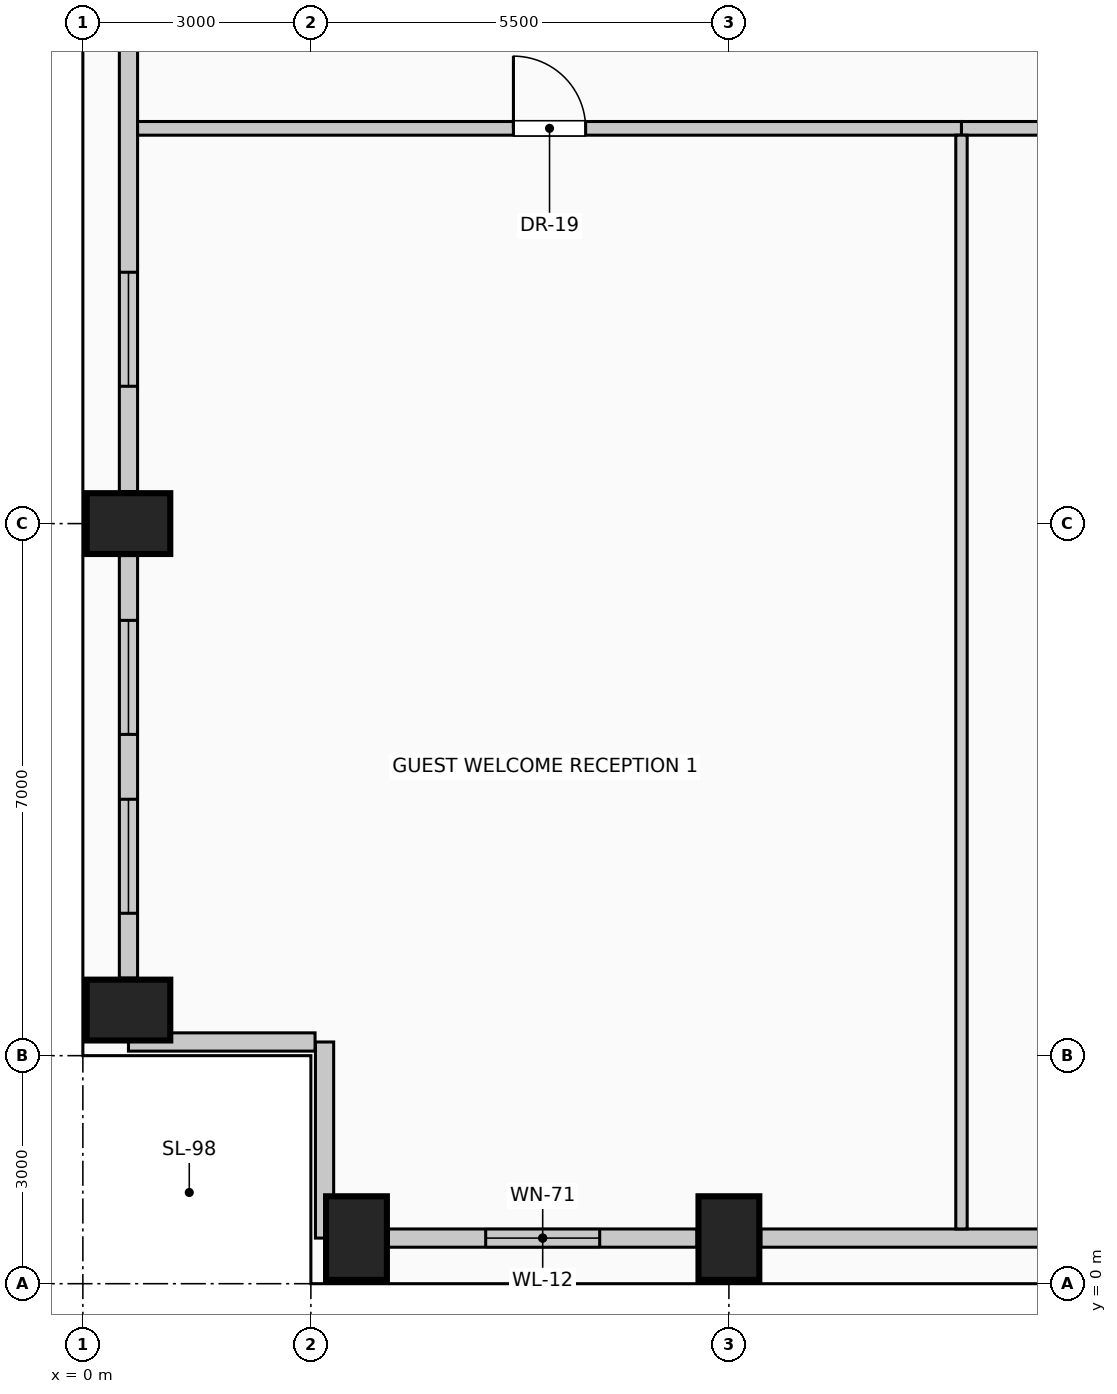
"""IFC4 building model, lengths in metres.
Left out: names, types, materials, properties, quantities, classifications, styles, units other than length and angle.
Written with IfcOpenShell. Run it as: python <this file> out.ifc"""

import sys

from ifc_helpers import new_model, si_unit, direction, frame, frame_2d, origin, origin_2d, place, context, subcontext, project, spatial, rectangle, extrude, element, fill, save


model = new_model("IFC4")
c1 = context("Model", 3, precision=1e-05, world=origin(), true_north=direction((0.0, 1.0)))
c2 = subcontext(c1, "Body", "Model", "MODEL_VIEW")
j1 = project(units=[si_unit("LENGTHUNIT", "METRE"), si_unit("PLANEANGLEUNIT", "RADIAN")], contexts=[c1])
p1 = place(None, origin())
s1 = spatial("IfcSite", under=j1, at=p1, CompositionType="ELEMENT")
p2 = place(p1, origin())
s2 = spatial("IfcBuilding", under=s1, at=p2, CompositionType="ELEMENT")
p3 = place(p2, frame((0.0, 0.0, 170.6)))
s3 = spatial("IfcBuildingStorey", under=s2, at=p3, CompositionType="ELEMENT", Elevation=170.6)
for number, where, z_axis, x_axis in (
    (1, (3.6, 0.6, 0.0), (0.0, 0.0, 1.0), (1.0, 0.0, 0.0)),
    (2, (8.5, 0.6, 0.0), (0.0, 0.0, 1.0), (1.0, 0.0, 0.0)),
    (3, (0.6, 3.6, 0.0), (0.0, 0.0, 1.0), (0.0, 1.0, 0.0)),
    (4, (0.6, 10.0, 0.0), (0.0, 0.0, 1.0), (0.0, 1.0, 0.0)),
):
    element("IfcColumn", number, at=place(p3, frame(where, z_axis=z_axis, x_axis=x_axis)), inside=s3, PredefinedType="COLUMN", context=c2, shape_type="SweptSolid", body=[
        extrude(rectangle(XDim=0.8, YDim=1.1, at=origin_2d()), origin(), (0.0, 0.0, 1.0), 4.0),
    ])
p4 = place(p3, frame((8.08, 0.6, 0.0), z_axis=(0.0, 0.0, 1.0), x_axis=(-1.0, 0.0, 0.0)))
e5 = element("IfcWall", 5, at=p4, inside=s3, PredefinedType="SOLIDWALL", context=c2, shape_type="SweptSolid", body=[
    extrude(rectangle(XDim=4.06, YDim=0.24, at=frame_2d((2.03, 0.0))), origin(), (0.0, 0.0, 1.0), 2.975),
])
p5 = place(p4, frame((1.28, 0.0, 0.42)))
e6 = element("IfcOpeningElement", 6, at=p5, cuts=e5, PredefinedType="OPENING", context=c2, shape_type="SweptSolid", body=[
    extrude(rectangle(XDim=1.5, YDim=2.2, at=frame_2d((0.75, 1.1))), frame((0.0, 0.13, 0.0), z_axis=(0.0, -1.0, 0.0), x_axis=(1.0, 0.0, 0.0)), (0.0, 0.0, 1.0), 0.26),
])
p6 = place(p3, frame((13.58, 0.6, 0.0), z_axis=(0.0, 0.0, 1.0), x_axis=(-1.0, 0.0, 0.0)))
e7 = element("IfcWall", 7, at=p6, inside=s3, PredefinedType="SOLIDWALL", context=c2, shape_type="SweptSolid", body=[
    extrude(rectangle(XDim=4.66, YDim=0.24, at=frame_2d((2.33, 0.0))), origin(), (0.0, 0.0, 1.0), 2.975),
])
p7 = place(p3, frame((0.6, 4.02, 0.0), z_axis=(0.0, 0.0, 1.0), x_axis=(0.0, 1.0, 0.0)))
e8 = element("IfcWall", 8, at=p7, inside=s3, PredefinedType="SOLIDWALL", context=c2, shape_type="SweptSolid", body=[
    extrude(rectangle(XDim=5.56, YDim=0.24, at=frame_2d((2.78, 0.0))), origin(), (0.0, 0.0, 1.0), 2.975),
])
p8 = place(p7, frame((0.853, 0.0, 0.42)))
e9 = element("IfcOpeningElement", 9, at=p8, cuts=e8, PredefinedType="OPENING", context=c2, shape_type="SweptSolid", body=[
    extrude(rectangle(XDim=1.5, YDim=2.2, at=frame_2d((0.75, 1.1))), frame((0.0, 0.13, 0.0), z_axis=(0.0, -1.0, 0.0), x_axis=(1.0, 0.0, 0.0)), (0.0, 0.0, 1.0), 0.26),
])
p9 = place(p7, frame((3.207, 0.0, 0.42)))
e10 = element("IfcOpeningElement", 10, at=p9, cuts=e8, PredefinedType="OPENING", context=c2, shape_type="SweptSolid", body=[
    extrude(rectangle(XDim=1.5, YDim=2.2, at=frame_2d((0.75, 1.1))), frame((0.0, 0.13, 0.0), z_axis=(0.0, -1.0, 0.0), x_axis=(1.0, 0.0, 0.0)), (0.0, 0.0, 1.0), 0.26),
])
p10 = place(p3, frame((0.6, 10.42, 0.0), z_axis=(0.0, 0.0, 1.0), x_axis=(0.0, 1.0, 0.0)))
e11 = element("IfcWall", 11, at=p10, inside=s3, PredefinedType="SOLIDWALL", context=c2, shape_type="SweptSolid", body=[
    extrude(rectangle(XDim=7.16, YDim=0.24, at=frame_2d((3.58, 0.0))), origin(), (0.0, 0.0, 1.0), 2.975),
])
p11 = place(p10, frame((1.387, 0.0, 0.42)))
e12 = element("IfcOpeningElement", 12, at=p11, cuts=e11, PredefinedType="OPENING", context=c2, shape_type="SweptSolid", body=[
    extrude(rectangle(XDim=1.5, YDim=2.2, at=frame_2d((0.75, 1.1))), frame((0.0, 0.13, 0.0), z_axis=(0.0, -1.0, 0.0), x_axis=(1.0, 0.0, 0.0)), (0.0, 0.0, 1.0), 0.26),
])
p12 = place(p3, frame((3.18, 0.6, 0.0), z_axis=(0.0, 0.0, 1.0), x_axis=(0.0, 1.0, 0.0)))
e13 = element("IfcWall", 13, at=p12, inside=s3, PredefinedType="SOLIDWALL", context=c2, shape_type="SweptSolid", body=[
    extrude(rectangle(XDim=2.58, YDim=0.24, at=frame_2d((1.29, 0.0))), origin(), (0.0, 0.0, 1.0), 3.725),
])
p13 = place(p3, frame((3.055, 3.18, 0.0), z_axis=(0.0, 0.0, 1.0), x_axis=(-1.0, 0.0, 0.0)))
e14 = element("IfcWall", 14, at=p13, inside=s3, PredefinedType="SOLIDWALL", context=c2, shape_type="SweptSolid", body=[
    extrude(rectangle(XDim=2.455, YDim=0.24, at=frame_2d((1.228, 0.0))), origin(), (0.0, 0.0, 1.0), 3.725),
])
p14 = place(p3, frame((0.72, 15.2, 0.0), z_axis=(0.0, 0.0, 1.0), x_axis=(1.0, 0.0, 0.0)))
e15 = element("IfcWall", 15, at=p14, inside=s3, PredefinedType="PARTITIONING", context=c2, shape_type="SweptSolid", body=[
    extrude(rectangle(XDim=10.84, YDim=0.18, at=frame_2d((5.42, 0.0))), origin(), (0.0, 0.0, 1.0), 3.725),
])
p15 = place(p14, frame((4.945, 0.0, 0.0)))
e16 = element("IfcOpeningElement", 16, at=p15, cuts=e15, PredefinedType="OPENING", context=c2, shape_type="SweptSolid", body=[
    extrude(rectangle(XDim=0.95, YDim=2.15, at=frame_2d((0.475, 1.075))), frame((0.0, 0.1, 0.0), z_axis=(0.0, -1.0, 0.0), x_axis=(1.0, 0.0, 0.0)), (0.0, 0.0, 1.0), 0.2),
])
p16 = place(p3, frame((11.56, 15.2, 0.0), z_axis=(0.0, 0.0, 1.0), x_axis=(1.0, 0.0, 0.0)))
e17 = element("IfcWall", 17, at=p16, inside=s3, PredefinedType="PARTITIONING", context=c2, shape_type="SweptSolid", body=[
    extrude(rectangle(XDim=6.0, YDim=0.18, at=frame_2d((3.0, 0.0))), origin(), (0.0, 0.0, 1.0), 3.725),
])
p17 = place(p16, frame((2.56, 0.0, 0.0)))
e18 = element("IfcOpeningElement", 18, at=p17, cuts=e17, PredefinedType="OPENING", context=c2, shape_type="SweptSolid", body=[
    extrude(rectangle(XDim=0.88, YDim=2.1, at=frame_2d((0.44, 1.05))), frame((0.0, 0.1, 0.0), z_axis=(0.0, -1.0, 0.0), x_axis=(1.0, 0.0, 0.0)), (0.0, 0.0, 1.0), 0.2),
])
p18 = place(p3, frame((11.56, 0.72, 0.0), z_axis=(0.0, 0.0, 1.0), x_axis=(0.0, 1.0, 0.0)))
e19 = element("IfcWall", 19, at=p18, inside=s3, PredefinedType="PARTITIONING", context=c2, shape_type="SweptSolid", body=[
    extrude(rectangle(XDim=14.39, YDim=0.15, at=frame_2d((7.195, 0.0))), origin(), (0.0, 0.0, 1.0), 3.725),
])
p19 = place(p5, origin())
e20 = element("IfcWindow", 20, at=p19, inside=s3, PartitioningType="SINGLE_PANEL", PredefinedType="WINDOW", context=c2, shape_type="SweptSolid", body=[
    extrude(rectangle(XDim=1.5, YDim=2.2, at=frame_2d((0.75, 1.1))), frame((0.0, 0.03, 0.0), z_axis=(0.0, -1.0, 0.0), x_axis=(1.0, 0.0, 0.0)), (0.0, 0.0, 1.0), 0.06),
])
fill(e6, e20)
p20 = place(p8, origin())
e21 = element("IfcWindow", 21, at=p20, inside=s3, PartitioningType="SINGLE_PANEL", PredefinedType="WINDOW", context=c2, shape_type="SweptSolid", body=[
    extrude(rectangle(XDim=1.5, YDim=2.2, at=frame_2d((0.75, 1.1))), frame((0.0, 0.03, 0.0), z_axis=(0.0, -1.0, 0.0), x_axis=(1.0, 0.0, 0.0)), (0.0, 0.0, 1.0), 0.06),
])
fill(e9, e21)
p21 = place(p9, origin())
e22 = element("IfcWindow", 22, at=p21, inside=s3, PartitioningType="SINGLE_PANEL", PredefinedType="WINDOW", context=c2, shape_type="SweptSolid", body=[
    extrude(rectangle(XDim=1.5, YDim=2.2, at=frame_2d((0.75, 1.1))), frame((0.0, 0.03, 0.0), z_axis=(0.0, -1.0, 0.0), x_axis=(1.0, 0.0, 0.0)), (0.0, 0.0, 1.0), 0.06),
])
fill(e10, e22)
p22 = place(p11, origin())
e23 = element("IfcWindow", 23, at=p22, inside=s3, PartitioningType="SINGLE_PANEL", PredefinedType="WINDOW", context=c2, shape_type="SweptSolid", body=[
    extrude(rectangle(XDim=1.5, YDim=2.2, at=frame_2d((0.75, 1.1))), frame((0.0, 0.03, 0.0), z_axis=(0.0, -1.0, 0.0), x_axis=(1.0, 0.0, 0.0)), (0.0, 0.0, 1.0), 0.06),
])
fill(e12, e23)
p23 = place(p15, origin())
e24 = element("IfcDoor", 24, at=p23, inside=s3, OperationType="SINGLE_SWING_LEFT", PredefinedType="DOOR", context=c2, shape_type="SweptSolid", body=[
    extrude(rectangle(XDim=0.95, YDim=2.15, at=frame_2d((0.475, 1.075))), frame((0.0, 0.025, 0.0), z_axis=(0.0, -1.0, 0.0), x_axis=(1.0, 0.0, 0.0)), (0.0, 0.0, 1.0), 0.05),
])
fill(e16, e24)
save(model, sys.argv[1])
